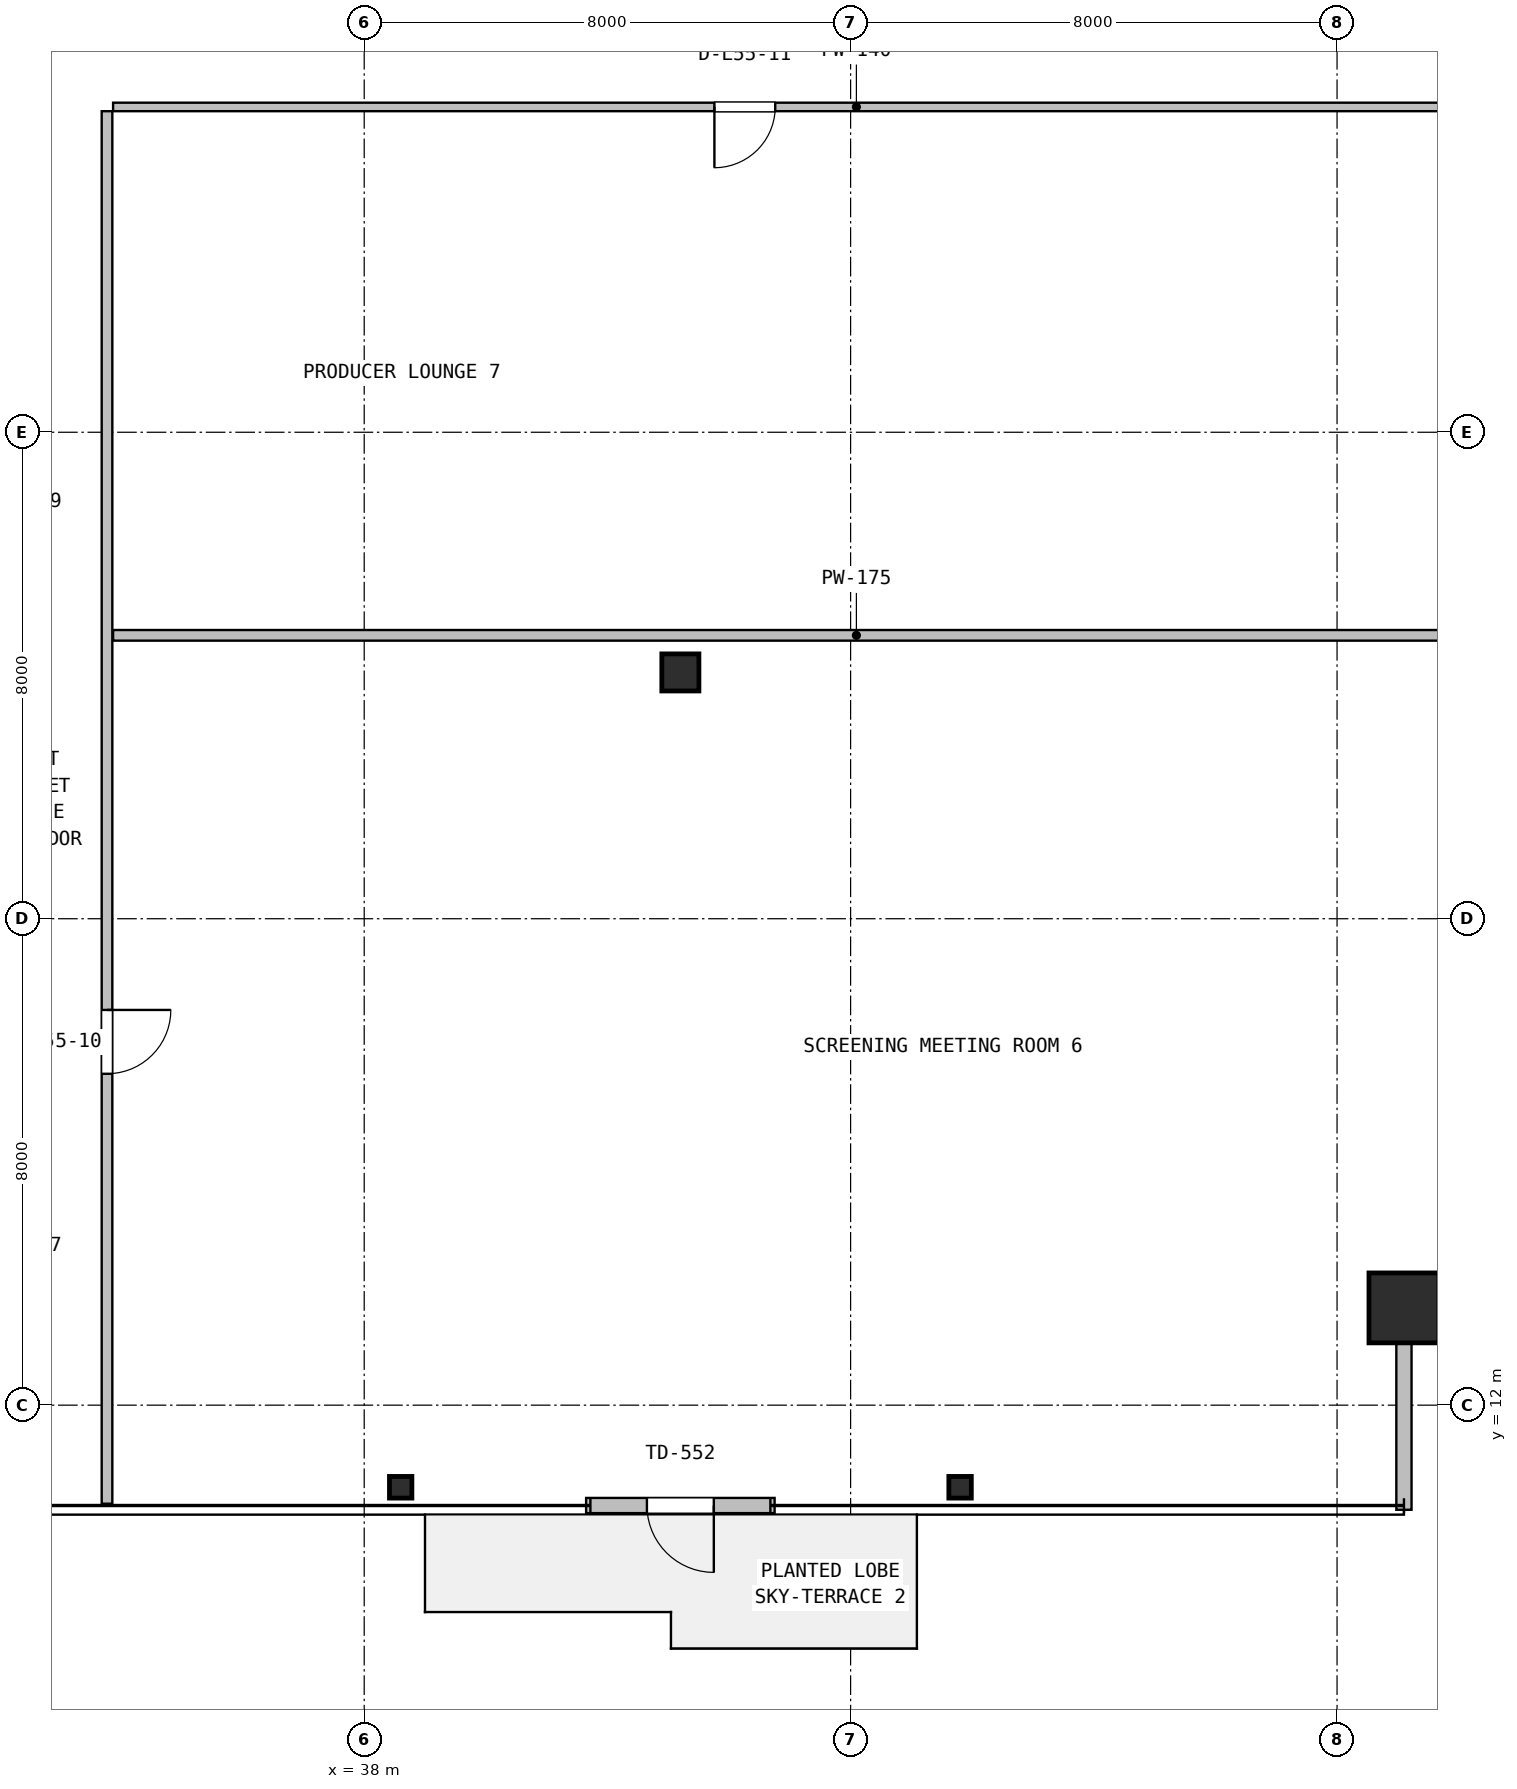
"""IFC4 building model, lengths in metres.
Left out: names, types, materials, properties, quantities, classifications, styles, units other than length and angle.
Written with IfcOpenShell. Run it as: python <this file> out.ifc"""

import sys

from ifc_helpers import new_model, si_unit, direction, frame, frame_2d, origin, origin_2d, place, context, subcontext, project, spatial, rectangle, hollow_rectangle, hollow_circle, i_section, extrude, source, transform, mapped, element, fill, save


model = new_model("IFC4")
c1 = context("Model", 3, precision=1e-05, world=origin(), true_north=direction((0.0, 1.0)))
c2 = subcontext(c1, "Body", "Model", "MODEL_VIEW")
j1 = project(units=[si_unit("LENGTHUNIT", "METRE"), si_unit("PLANEANGLEUNIT", "RADIAN")], contexts=[c1])
p1 = place(None, origin())
s1 = spatial("IfcSite", under=j1, at=p1, CompositionType="ELEMENT")
p2 = place(p1, origin())
s2 = spatial("IfcBuilding", under=s1, at=p2, CompositionType="ELEMENT")
p3 = place(p2, frame((0.0, 0.0, 222.6)))
s3 = spatial("IfcBuildingStorey", under=s2, at=p3, CompositionType="ELEMENT", Elevation=222.6)
m1 = source(origin(), c2, "Body", "SweptSolid", [
    extrude(hollow_rectangle(XDim=1.15, YDim=1.15, WallThickness=0.045, at=origin_2d()), origin(), (0.0, 0.0, 1.0), 3.8),
])
p4 = place(p3, frame((55.1, 13.6, 0.0), z_axis=(0.0, 0.0, 1.0), x_axis=(1.0, 0.0, 0.0)))
e1 = element("IfcColumn", 1, at=p4, inside=s3, PredefinedType="COLUMN", context=c2, shape_type="MappedRepresentation", body=[
    mapped(m1, transform((0.0, 0.0, 0.0), x_axis=(1.0, 0.0, 0.0), y_axis=(0.0, 1.0, 0.0), z_axis=(0.0, 0.0, 1.0), scale=1.0)),
])
m2 = source(origin(), c2, "Body", "SweptSolid", [
    extrude(i_section(OverallWidth=0.369, OverallDepth=0.356, WebThickness=0.011, FlangeThickness=0.018, FilletRadius=0.016, at=origin_2d()), origin(), (0.0, 0.0, 1.0), 3.8),
])
for number, where, z_axis, x_axis in (
    (2, (38.6, 10.65, 0.0), (0.0, 0.0, 1.0), (1.0, 0.0, 0.0)),
    (3, (47.8, 10.65, 0.0), (0.0, 0.0, 1.0), (1.0, 0.0, 0.0)),
):
    element("IfcColumn", number, at=place(p3, frame(where, z_axis=z_axis, x_axis=x_axis)), inside=s3, PredefinedType="COLUMN", context=c2, shape_type="MappedRepresentation", body=[
        mapped(m2, transform((0.0, 0.0, 0.0), x_axis=(1.0, 0.0, 0.0), y_axis=(0.0, 1.0, 0.0), z_axis=(0.0, 0.0, 1.0), scale=1.0)),
    ])
m3 = source(origin(), c2, "Body", "SweptSolid", [
    extrude(hollow_circle(Radius=0.305, WallThickness=0.025, at=origin_2d()), origin(), (0.0, 0.0, 1.0), 3.8),
])
p5 = place(p3, frame((43.2, 24.05, 0.0), z_axis=(0.0, 0.0, 1.0), x_axis=(1.0, 0.0, 0.0)))
e4 = element("IfcColumn", 4, at=p5, inside=s3, PredefinedType="COLUMN", context=c2, shape_type="MappedRepresentation", body=[
    mapped(m3, transform((0.0, 0.0, 0.0), x_axis=(1.0, 0.0, 0.0), y_axis=(0.0, 1.0, 0.0), z_axis=(0.0, 0.0, 1.0), scale=1.0)),
])
p6 = place(p3, frame((41.65, 10.35, 0.0), z_axis=(0.0, 0.0, 1.0), x_axis=(1.0, 0.0, 0.0)))
e5 = element("IfcWall", 5, at=p6, inside=s3, PredefinedType="SOLIDWALL", context=c2, shape_type="SweptSolid", body=[
    extrude(rectangle(XDim=3.1, YDim=0.25, at=frame_2d((1.55, 0.0))), origin(), (0.0, 0.0, 1.0), 3.53),
])
p7 = place(p6, frame((1.0, 0.0, 0.0)))
e6 = element("IfcOpeningElement", 6, at=p7, cuts=e5, PredefinedType="OPENING", context=c2, shape_type="SweptSolid", body=[
    extrude(rectangle(XDim=1.1, YDim=2.15, at=frame_2d((0.55, 1.075))), frame((0.0, 0.135, 0.0), z_axis=(0.0, -1.0, 0.0), x_axis=(1.0, 0.0, 0.0)), (0.0, 0.0, 1.0), 0.27),
])
p8 = place(p3, frame((55.1, 10.28, 0.0), z_axis=(0.0, 0.0, 1.0), x_axis=(0.0, 1.0, 0.0)))
e7 = element("IfcWall", 7, at=p8, inside=s3, PredefinedType="SOLIDWALL", context=c2, shape_type="SweptSolid", body=[
    extrude(rectangle(XDim=3.4, YDim=0.25, at=frame_2d((1.7, 0.0))), origin(), (0.0, 0.0, 1.0), 3.171),
])
p9 = place(p3, frame((33.87, 24.66, 0.0), z_axis=(0.0, 0.0, 1.0), x_axis=(1.0, 0.0, 0.0)))
e8 = element("IfcWall", 8, at=p9, inside=s3, PredefinedType="PARTITIONING", context=c2, shape_type="SweptSolid", body=[
    extrude(rectangle(XDim=24.45, YDim=0.175, at=frame_2d((12.225, 0.0))), origin(), (0.0, 0.0, 1.0), 2.908),
])
p10 = place(p3, frame((33.77, 10.38, 0.0), z_axis=(0.0, 0.0, 1.0), x_axis=(0.0, 1.0, 0.0)))
e9 = element("IfcWall", 9, at=p10, inside=s3, PredefinedType="PARTITIONING", context=c2, shape_type="SweptSolid", body=[
    extrude(rectangle(XDim=22.9, YDim=0.175, at=frame_2d((11.45, 0.0))), origin(), (0.0, 0.0, 1.0), 2.908),
])
p11 = place(p10, frame((7.07, 0.0, 0.0)))
e10 = element("IfcOpeningElement", 10, at=p11, cuts=e9, PredefinedType="OPENING", context=c2, shape_type="SweptSolid", body=[
    extrude(rectangle(XDim=1.05, YDim=2.1, at=frame_2d((0.525, 1.05))), frame((0.0, 0.098, 0.0), z_axis=(0.0, -1.0, 0.0), x_axis=(1.0, 0.0, 0.0)), (0.0, 0.0, 1.0), 0.195),
])
p12 = place(p3, frame((33.87, 33.35, 0.0), z_axis=(0.0, 0.0, 1.0), x_axis=(1.0, 0.0, 0.0)))
e11 = element("IfcWall", 11, at=p12, inside=s3, PredefinedType="PARTITIONING", context=c2, shape_type="SweptSolid", body=[
    extrude(rectangle(XDim=24.45, YDim=0.14, at=frame_2d((12.225, 0.0))), origin(), (0.0, 0.0, 1.0), 2.908),
])
p13 = place(p12, frame((9.89, 0.0, 0.0)))
e12 = element("IfcOpeningElement", 12, at=p13, cuts=e11, PredefinedType="OPENING", context=c2, shape_type="SweptSolid", body=[
    extrude(rectangle(XDim=1.0, YDim=2.1, at=frame_2d((0.5, 1.05))), frame((0.0, 0.08, 0.0), z_axis=(0.0, -1.0, 0.0), x_axis=(1.0, 0.0, 0.0)), (0.0, 0.0, 1.0), 0.16),
])
m4 = source(origin(), c2, "Body", "SweptSolid", [
    extrude(rectangle(XDim=1.1, YDim=2.15, at=frame_2d((0.55, 1.075))), frame((0.0, 0.025, 0.0), z_axis=(0.0, -1.0, 0.0), x_axis=(1.0, 0.0, 0.0)), (0.0, 0.0, 1.0), 0.05),
])
p14 = place(p7, frame((1.1, 0.0, 0.0), z_axis=(0.0, 0.0, 1.0), x_axis=(-1.0, 0.0, 0.0)))
e13 = element("IfcDoor", 13, at=p14, inside=s3, OperationType="SINGLE_SWING_RIGHT", PredefinedType="DOOR", context=c2, shape_type="MappedRepresentation", body=[
    mapped(m4, transform((0.0, 0.0, 0.0), x_axis=(1.0, 0.0, 0.0), y_axis=(0.0, 1.0, 0.0), z_axis=(0.0, 0.0, 1.0), scale=1.0)),
])
fill(e6, e13)
m5 = source(origin(), c2, "Body", "SweptSolid", [
    extrude(rectangle(XDim=1.05, YDim=2.1, at=frame_2d((0.525, 1.05))), frame((0.0, 0.025, 0.0), z_axis=(0.0, -1.0, 0.0), x_axis=(1.0, 0.0, 0.0)), (0.0, 0.0, 1.0), 0.05),
])
p15 = place(p11, frame((1.05, 0.0, 0.0), z_axis=(0.0, 0.0, 1.0), x_axis=(-1.0, 0.0, 0.0)))
e14 = element("IfcDoor", 14, at=p15, inside=s3, OperationType="SINGLE_SWING_RIGHT", PredefinedType="DOOR", context=c2, shape_type="MappedRepresentation", body=[
    mapped(m5, transform((0.0, 0.0, 0.0), x_axis=(1.0, 0.0, 0.0), y_axis=(0.0, 1.0, 0.0), z_axis=(0.0, 0.0, 1.0), scale=1.0)),
])
fill(e10, e14)
m6 = source(origin(), c2, "Body", "SweptSolid", [
    extrude(rectangle(XDim=1.0, YDim=2.1, at=frame_2d((0.5, 1.05))), frame((0.0, 0.025, 0.0), z_axis=(0.0, -1.0, 0.0), x_axis=(1.0, 0.0, 0.0)), (0.0, 0.0, 1.0), 0.05),
])
p16 = place(p13, frame((1.0, 0.0, 0.0), z_axis=(0.0, 0.0, 1.0), x_axis=(-1.0, 0.0, 0.0)))
e15 = element("IfcDoor", 15, at=p16, inside=s3, OperationType="SINGLE_SWING_LEFT", PredefinedType="DOOR", context=c2, shape_type="MappedRepresentation", body=[
    mapped(m6, transform((0.0, 0.0, 0.0), x_axis=(1.0, 0.0, 0.0), y_axis=(0.0, 1.0, 0.0), z_axis=(0.0, 0.0, 1.0), scale=1.0)),
])
fill(e12, e15)
save(model, sys.argv[1])
